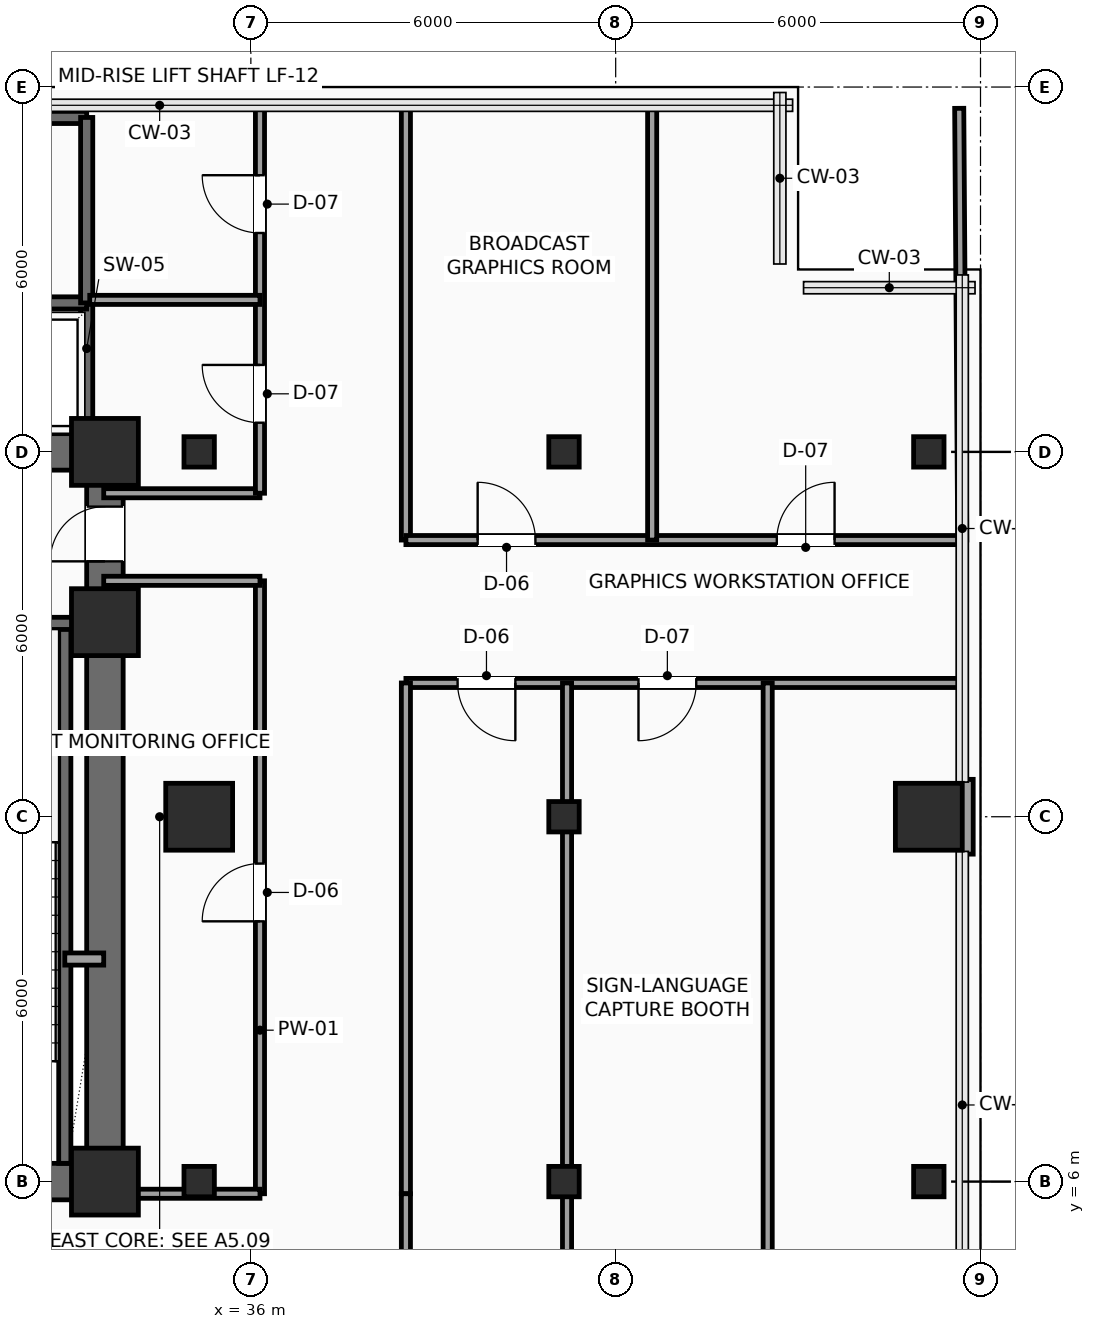
"""IFC4 building model, lengths in metres.
Left out: names, types, materials, properties, quantities, classifications, styles, units other than length and angle.
Written with IfcOpenShell. Run it as: python <this file> out.ifc"""

import sys

from ifc_helpers import new_model, si_unit, direction, frame, frame_2d, origin, origin_2d, place, context, subcontext, project, spatial, rectangle, hollow_rectangle, extrude, element, fill, save


model = new_model("IFC4")
c1 = context("Model", 3, precision=1e-05, world=origin(), true_north=direction((0.0, 1.0)))
c2 = subcontext(c1, "Body", "Model", "MODEL_VIEW")
j1 = project(units=[si_unit("LENGTHUNIT", "METRE"), si_unit("PLANEANGLEUNIT", "RADIAN")], contexts=[c1])
p1 = place(None, origin())
s1 = spatial("IfcSite", under=j1, at=p1, CompositionType="ELEMENT")
p2 = place(p1, origin())
s2 = spatial("IfcBuilding", under=s1, at=p2, CompositionType="ELEMENT")
p3 = place(p2, frame((0.0, 0.0, 156.9)))
s3 = spatial("IfcBuildingStorey", under=s2, at=p3, CompositionType="ELEMENT", Elevation=156.9)
for number, where, z_axis, x_axis in (
    (1, (33.6, 6.0, 0.0), (0.0, 0.0, 1.0), (1.0, 0.0, 0.0)),
    (2, (33.6, 15.2, 0.0), (0.0, 0.0, 1.0), (1.0, 0.0, 0.0)),
    (3, (33.6, 18.0, 0.0), (0.0, 0.0, 1.0), (1.0, 0.0, 0.0)),
):
    element("IfcColumn", number, at=place(p3, frame(where, z_axis=z_axis, x_axis=x_axis)), inside=s3, PredefinedType="COLUMN", context=c2, shape_type="SweptSolid", body=[
        extrude(rectangle(XDim=1.1, YDim=1.1, at=origin_2d()), origin(), (0.0, 0.0, 1.0), 3.75),
    ])
p4 = place(p3, frame((35.15, 6.0, 0.0), z_axis=(0.0, 0.0, 1.0), x_axis=(1.0, 0.0, 0.0)))
e4 = element("IfcColumn", 4, at=p4, inside=s3, PredefinedType="COLUMN", context=c2, shape_type="SweptSolid", body=[
    extrude(hollow_rectangle(XDim=0.5, YDim=0.5, WallThickness=0.025, InnerFilletRadius=0.025, OuterFilletRadius=0.04, at=origin_2d()), origin(), (0.0, 0.0, 1.0), 3.75),
])
p5 = place(p3, frame((35.15, 12.0, 0.0), z_axis=(0.0, 0.0, 1.0), x_axis=(1.0, 0.0, 0.0)))
e5 = element("IfcColumn", 5, at=p5, inside=s3, PredefinedType="COLUMN", context=c2, shape_type="SweptSolid", body=[
    extrude(rectangle(XDim=1.1, YDim=1.1, at=origin_2d()), origin(), (0.0, 0.0, 1.0), 3.75),
])
for number, where, z_axis, x_axis in (
    (6, (35.15, 18.0, 0.0), (0.0, 0.0, 1.0), (1.0, 0.0, 0.0)),
    (7, (41.15, 6.0, 0.0), (0.0, 0.0, 1.0), (1.0, 0.0, 0.0)),
    (8, (41.15, 12.0, 0.0), (0.0, 0.0, 1.0), (1.0, 0.0, 0.0)),
    (9, (41.15, 18.0, 0.0), (0.0, 0.0, 1.0), (1.0, 0.0, 0.0)),
    (10, (47.15, 6.0, 0.0), (0.0, 0.0, 1.0), (1.0, 0.0, 0.0)),
):
    element("IfcColumn", number, at=place(p3, frame(where, z_axis=z_axis, x_axis=x_axis)), inside=s3, PredefinedType="COLUMN", context=c2, shape_type="SweptSolid", body=[
        extrude(hollow_rectangle(XDim=0.5, YDim=0.5, WallThickness=0.025, InnerFilletRadius=0.025, OuterFilletRadius=0.04, at=origin_2d()), origin(), (0.0, 0.0, 1.0), 3.75),
    ])
p6 = place(p3, frame((47.15, 12.0, 0.0), z_axis=(0.0, 0.0, 1.0), x_axis=(1.0, 0.0, 0.0)))
e11 = element("IfcColumn", 11, at=p6, inside=s3, PredefinedType="COLUMN", context=c2, shape_type="SweptSolid", body=[
    extrude(rectangle(XDim=1.1, YDim=1.1, at=origin_2d()), origin(), (0.0, 0.0, 1.0), 3.75),
])
p7 = place(p3, frame((47.15, 18.0, 0.0), z_axis=(0.0, 0.0, 1.0), x_axis=(1.0, 0.0, 0.0)))
e12 = element("IfcColumn", 12, at=p7, inside=s3, PredefinedType="COLUMN", context=c2, shape_type="SweptSolid", body=[
    extrude(hollow_rectangle(XDim=0.5, YDim=0.5, WallThickness=0.025, InnerFilletRadius=0.025, OuterFilletRadius=0.04, at=origin_2d()), origin(), (0.0, 0.0, 1.0), 3.75),
])
p8 = place(p3, frame((47.76, 12.615, 0.0), z_axis=(0.0, 0.0, 1.0), x_axis=(0.0, -1.0, 0.0)))
e13 = element("IfcWall", 13, at=p8, inside=s3, PredefinedType="SOLIDWALL", context=c2, shape_type="SweptSolid", body=[
    extrude(rectangle(XDim=1.23, YDim=0.24, at=frame_2d((0.615, 0.0))), origin(), (0.0, 0.0, 1.0), 3.525),
])
for number, where, z_axis, x_axis in (
    (14, (24.0, 6.0, 0.0), (0.0, 0.0, 1.0), (1.0, 0.0, 0.0)),
    (15, (24.0, 18.0, 0.0), (0.0, 0.0, 1.0), (1.0, 0.0, 0.0)),
):
    element("IfcWall", number, at=place(p3, frame(where, z_axis=z_axis, x_axis=x_axis)), inside=s3, PredefinedType="SHEAR", context=c2, shape_type="SweptSolid", body=[
        extrude(rectangle(XDim=9.6, YDim=0.6, at=frame_2d((4.8, 0.0))), origin(), (0.0, 0.0, 1.0), 3.525),
    ])
p9 = place(p3, frame((33.6, 6.0, 0.0), z_axis=(0.0, 0.0, 1.0), x_axis=(0.0, 1.0, 0.0)))
e16 = element("IfcWall", 16, at=p9, inside=s3, PredefinedType="SHEAR", context=c2, shape_type="SweptSolid", body=[
    extrude(rectangle(XDim=12.0, YDim=0.6, at=frame_2d((6.0, 0.0))), origin(), (0.0, 0.0, 1.0), 3.525),
])
p10 = place(p9, frame((10.2, 0.0, 0.0)))
e17 = element("IfcOpeningElement", 17, at=p10, cuts=e16, PredefinedType="OPENING", context=c2, shape_type="SweptSolid", body=[
    extrude(rectangle(XDim=0.9, YDim=2.15, at=frame_2d((0.45, 1.075))), frame((0.0, 0.31, 0.0), z_axis=(0.0, -1.0, 0.0), x_axis=(1.0, 0.0, 0.0)), (0.0, 0.0, 1.0), 0.62),
])
p11 = place(p3, frame((32.94, 6.3, 0.0), z_axis=(0.0, 0.0, 1.0), x_axis=(0.0, 1.0, 0.0)))
e18 = element("IfcWall", 18, at=p11, inside=s3, PredefinedType="SHEAR", context=c2, shape_type="SweptSolid", body=[
    extrude(rectangle(XDim=8.88, YDim=0.2, at=frame_2d((4.44, 0.0))), origin(), (0.0, 0.0, 1.0), 3.525),
])
p12 = place(p3, frame((29.26, 15.18, 0.0), z_axis=(0.0, 0.0, 1.0), x_axis=(1.0, 0.0, 0.0)))
e19 = element("IfcWall", 19, at=p12, inside=s3, PredefinedType="SHEAR", context=c2, shape_type="SweptSolid", body=[
    extrude(rectangle(XDim=4.04, YDim=0.2, at=frame_2d((2.02, 0.0))), origin(), (0.0, 0.0, 1.0), 3.525),
])
p13 = place(p3, frame((32.94, 9.66, 0.0), z_axis=(0.0, 0.0, 1.0), x_axis=(1.0, 0.0, 0.0)))
e20 = element("IfcWall", 20, at=p13, inside=s3, PredefinedType="SOLIDWALL", context=c2, shape_type="SweptSolid", body=[
    extrude(rectangle(XDim=0.64, YDim=0.2, at=frame_2d((0.32, 0.0))), origin(), (0.0, 0.0, 1.0), 3.525),
])
p14 = place(p3, frame((33.3, 18.1, 0.0), z_axis=(0.0, 0.0, 1.0), x_axis=(0.0, 1.0, 0.0)))
e21 = element("IfcWall", 21, at=p14, inside=s3, PredefinedType="SHEAR", context=c2, shape_type="SweptSolid", body=[
    extrude(rectangle(XDim=2.35, YDim=0.2, at=frame_2d((1.175, 0.0))), origin(), (0.0, 0.0, 1.0), 3.525),
])
p15 = place(p3, frame((24.25, 20.45, 0.0), z_axis=(0.0, 0.0, 1.0), x_axis=(1.0, 0.0, 0.0)))
e22 = element("IfcWall", 22, at=p15, inside=s3, PredefinedType="SHEAR", context=c2, shape_type="SweptSolid", body=[
    extrude(rectangle(XDim=9.05, YDim=0.2, at=frame_2d((4.525, 0.0))), origin(), (0.0, 0.0, 1.0), 3.525),
])
p16 = place(p15, frame((0.4, 0.0, 0.0)))
e23 = element("IfcOpeningElement", 23, at=p16, cuts=e22, PredefinedType="OPENING", context=c2, shape_type="SweptSolid", body=[
    extrude(rectangle(XDim=1.2, YDim=2.2, at=frame_2d((0.6, 1.1))), frame((0.0, 0.11, 0.0), z_axis=(0.0, -1.0, 0.0), x_axis=(1.0, 0.0, 0.0)), (0.0, 0.0, 1.0), 0.22),
])
p17 = place(p15, frame((2.65, 0.0, 0.0)))
e24 = element("IfcOpeningElement", 24, at=p17, cuts=e22, PredefinedType="OPENING", context=c2, shape_type="SweptSolid", body=[
    extrude(rectangle(XDim=1.2, YDim=2.2, at=frame_2d((0.6, 1.1))), frame((0.0, 0.11, 0.0), z_axis=(0.0, -1.0, 0.0), x_axis=(1.0, 0.0, 0.0)), (0.0, 0.0, 1.0), 0.22),
])
p18 = place(p15, frame((4.9, 0.0, 0.0)))
e25 = element("IfcOpeningElement", 25, at=p18, cuts=e22, PredefinedType="OPENING", context=c2, shape_type="SweptSolid", body=[
    extrude(rectangle(XDim=1.2, YDim=2.2, at=frame_2d((0.6, 1.1))), frame((0.0, 0.11, 0.0), z_axis=(0.0, -1.0, 0.0), x_axis=(1.0, 0.0, 0.0)), (0.0, 0.0, 1.0), 0.22),
])
p19 = place(p15, frame((7.15, 0.0, 0.0)))
e26 = element("IfcOpeningElement", 26, at=p19, cuts=e22, PredefinedType="OPENING", context=c2, shape_type="SweptSolid", body=[
    extrude(rectangle(XDim=1.2, YDim=2.2, at=frame_2d((0.6, 1.1))), frame((0.0, 0.11, 0.0), z_axis=(0.0, -1.0, 0.0), x_axis=(1.0, 0.0, 0.0)), (0.0, 0.0, 1.0), 0.22),
])
p20 = place(p3, frame((24.15, 23.5, 0.0), z_axis=(0.0, 0.0, 1.0), x_axis=(1.0, 0.0, 0.0)))
e27 = element("IfcWall", 27, at=p20, inside=s3, PredefinedType="SHEAR", context=c2, shape_type="SweptSolid", body=[
    extrude(rectangle(XDim=9.15, YDim=0.2, at=frame_2d((4.575, 0.0))), origin(), (0.0, 0.0, 1.0), 3.525),
])
p21 = place(p3, frame((33.3, 20.45, 0.0), z_axis=(0.0, 0.0, 1.0), x_axis=(0.0, 1.0, 0.0)))
e28 = element("IfcWall", 28, at=p21, inside=s3, PredefinedType="SHEAR", context=c2, shape_type="SweptSolid", body=[
    extrude(rectangle(XDim=3.05, YDim=0.2, at=frame_2d((1.525, 0.0))), origin(), (0.0, 0.0, 1.0), 3.525),
])
p22 = place(p3, frame((36.15, 5.8, 0.0), z_axis=(0.0, 0.0, 1.0), x_axis=(0.0, 1.0, 0.0)))
e29 = element("IfcWall", 29, at=p22, inside=s3, PredefinedType="PARTITIONING", context=c2, shape_type="SweptSolid", body=[
    extrude(rectangle(XDim=10.08, YDim=0.15, at=frame_2d((5.04, 0.0))), origin(), (0.0, 0.0, 1.0), 3.525),
])
p23 = place(p22, frame((4.48, 0.0, 0.0)))
e30 = element("IfcOpeningElement", 30, at=p23, cuts=e29, PredefinedType="OPENING", context=c2, shape_type="SweptSolid", body=[
    extrude(rectangle(XDim=0.95, YDim=2.15, at=frame_2d((0.475, 1.075))), frame((0.0, 0.085, 0.0), z_axis=(0.0, -1.0, 0.0), x_axis=(1.0, 0.0, 0.0)), (0.0, 0.0, 1.0), 0.17),
])
for number, where, z_axis, x_axis in (
    (31, (36.15, 15.88, 0.0), (0.0, 0.0, 1.0), (-1.0, 0.0, 0.0)),
    (32, (33.58, 17.32, 0.0), (0.0, 0.0, 1.0), (1.0, 0.0, 0.0)),
):
    element("IfcWall", number, at=place(p3, frame(where, z_axis=z_axis, x_axis=x_axis)), inside=s3, PredefinedType="PARTITIONING", context=c2, shape_type="SweptSolid", body=[
        extrude(rectangle(XDim=2.57, YDim=0.15, at=frame_2d((1.285, 0.0))), origin(), (0.0, 0.0, 1.0), 3.525),
    ])
p24 = place(p3, frame((36.15, 17.32, 0.0), z_axis=(0.0, 0.0, 1.0), x_axis=(0.0, 1.0, 0.0)))
e33 = element("IfcWall", 33, at=p24, inside=s3, PredefinedType="PARTITIONING", context=c2, shape_type="SweptSolid", body=[
    extrude(rectangle(XDim=6.38, YDim=0.15, at=frame_2d((3.19, 0.0))), origin(), (0.0, 0.0, 1.0), 3.525),
])
p25 = place(p24, frame((1.16, 0.0, 0.0)))
e34 = element("IfcOpeningElement", 34, at=p25, cuts=e33, PredefinedType="OPENING", context=c2, shape_type="SweptSolid", body=[
    extrude(rectangle(XDim=0.95, YDim=2.15, at=frame_2d((0.475, 1.075))), frame((0.0, 0.085, 0.0), z_axis=(0.0, -1.0, 0.0), x_axis=(1.0, 0.0, 0.0)), (0.0, 0.0, 1.0), 0.17),
])
p26 = place(p24, frame((4.28, 0.0, 0.0)))
e35 = element("IfcOpeningElement", 35, at=p26, cuts=e33, PredefinedType="OPENING", context=c2, shape_type="SweptSolid", body=[
    extrude(rectangle(XDim=0.95, YDim=2.15, at=frame_2d((0.475, 1.075))), frame((0.0, 0.085, 0.0), z_axis=(0.0, -1.0, 0.0), x_axis=(1.0, 0.0, 0.0)), (0.0, 0.0, 1.0), 0.17),
])
p27 = place(p3, frame((38.55, 23.7, 0.0), z_axis=(0.0, 0.0, 1.0), x_axis=(0.0, -1.0, 0.0)))
e36 = element("IfcWall", 36, at=p27, inside=s3, PredefinedType="PARTITIONING", context=c2, shape_type="SweptSolid", body=[
    extrude(rectangle(XDim=7.15, YDim=0.15, at=frame_2d((3.575, 0.0))), origin(), (0.0, 0.0, 1.0), 3.525),
])
p28 = place(p3, frame((38.55, 16.55, 0.0), z_axis=(0.0, 0.0, 1.0), x_axis=(1.0, 0.0, 0.0)))
e37 = element("IfcWall", 37, at=p28, inside=s3, PredefinedType="PARTITIONING", context=c2, shape_type="SweptSolid", body=[
    extrude(rectangle(XDim=9.15, YDim=0.15, at=frame_2d((4.575, 0.0))), origin(), (0.0, 0.0, 1.0), 3.525),
])
p29 = place(p28, frame((1.18, 0.0, 0.0)))
e38 = element("IfcOpeningElement", 38, at=p29, cuts=e37, PredefinedType="OPENING", context=c2, shape_type="SweptSolid", body=[
    extrude(rectangle(XDim=0.95, YDim=2.15, at=frame_2d((0.475, 1.075))), frame((0.0, 0.085, 0.0), z_axis=(0.0, -1.0, 0.0), x_axis=(1.0, 0.0, 0.0)), (0.0, 0.0, 1.0), 0.17),
])
p30 = place(p28, frame((6.1, 0.0, 0.0)))
e39 = element("IfcOpeningElement", 39, at=p30, cuts=e37, PredefinedType="OPENING", context=c2, shape_type="SweptSolid", body=[
    extrude(rectangle(XDim=0.95, YDim=2.15, at=frame_2d((0.475, 1.075))), frame((0.0, 0.085, 0.0), z_axis=(0.0, -1.0, 0.0), x_axis=(1.0, 0.0, 0.0)), (0.0, 0.0, 1.0), 0.17),
])
p31 = place(p3, frame((47.7, 14.2, 0.0), z_axis=(0.0, 0.0, 1.0), x_axis=(-1.0, 0.0, 0.0)))
e40 = element("IfcWall", 40, at=p31, inside=s3, PredefinedType="PARTITIONING", context=c2, shape_type="SweptSolid", body=[
    extrude(rectangle(XDim=9.15, YDim=0.15, at=frame_2d((4.575, 0.0))), origin(), (0.0, 0.0, 1.0), 3.525),
])
p32 = place(p31, frame((7.35, 0.0, 0.0)))
e41 = element("IfcOpeningElement", 41, at=p32, cuts=e40, PredefinedType="OPENING", context=c2, shape_type="SweptSolid", body=[
    extrude(rectangle(XDim=0.95, YDim=2.15, at=frame_2d((0.475, 1.075))), frame((0.0, 0.085, 0.0), z_axis=(0.0, -1.0, 0.0), x_axis=(1.0, 0.0, 0.0)), (0.0, 0.0, 1.0), 0.17),
])
p33 = place(p31, frame((4.375, 0.0, 0.0)))
e42 = element("IfcOpeningElement", 42, at=p33, cuts=e40, PredefinedType="OPENING", context=c2, shape_type="SweptSolid", body=[
    extrude(rectangle(XDim=0.95, YDim=2.15, at=frame_2d((0.475, 1.075))), frame((0.0, 0.085, 0.0), z_axis=(0.0, -1.0, 0.0), x_axis=(1.0, 0.0, 0.0)), (0.0, 0.0, 1.0), 0.17),
])
p34 = place(p3, frame((38.55, 14.2, 0.0), z_axis=(0.0, 0.0, 1.0), x_axis=(0.0, -1.0, 0.0)))
e43 = element("IfcWall", 43, at=p34, inside=s3, PredefinedType="PARTITIONING", context=c2, shape_type="SweptSolid", body=[
    extrude(rectangle(XDim=8.4, YDim=0.15, at=frame_2d((4.2, 0.0))), origin(), (0.0, 0.0, 1.0), 3.525),
])
p35 = place(p3, frame((38.55, 5.8, 0.0), z_axis=(0.0, 0.0, 1.0), x_axis=(0.0, -1.0, 0.0)))
e44 = element("IfcWall", 44, at=p35, inside=s3, PredefinedType="PARTITIONING", context=c2, shape_type="SweptSolid", body=[
    extrude(rectangle(XDim=2.35, YDim=0.15, at=frame_2d((1.175, 0.0))), origin(), (0.0, 0.0, 1.0), 3.525),
])
p36 = place(p3, frame((33.65, 5.8, 0.0), z_axis=(0.0, 0.0, 1.0), x_axis=(1.0, 0.0, 0.0)))
e45 = element("IfcWall", 45, at=p36, inside=s3, PredefinedType="PARTITIONING", context=c2, shape_type="SweptSolid", body=[
    extrude(rectangle(XDim=2.5, YDim=0.15, at=frame_2d((1.25, 0.0))), origin(), (0.0, 0.0, 1.0), 3.017),
])
p37 = place(p3, frame((33.35, 20.5, 0.0), z_axis=(0.0, 0.0, 1.0), x_axis=(1.0, 0.0, 0.0)))
e46 = element("IfcWall", 46, at=p37, inside=s3, PredefinedType="PARTITIONING", context=c2, shape_type="SweptSolid", body=[
    extrude(rectangle(XDim=2.8, YDim=0.15, at=frame_2d((1.4, 0.0))), origin(), (0.0, 0.0, 1.0), 3.525),
])
p38 = place(p3, frame((41.2, 0.3, 0.0), z_axis=(0.0, 0.0, 1.0), x_axis=(0.0, 1.0, 0.0)))
e47 = element("IfcWall", 47, at=p38, inside=s3, PredefinedType="PARTITIONING", context=c2, shape_type="SweptSolid", body=[
    extrude(rectangle(XDim=13.9, YDim=0.15, at=frame_2d((6.95, 0.0))), origin(), (0.0, 0.0, 1.0), 3.017),
])
p39 = place(p3, frame((44.5, 0.3, 0.0), z_axis=(0.0, 0.0, 1.0), x_axis=(0.0, 1.0, 0.0)))
e48 = element("IfcWall", 48, at=p39, inside=s3, PredefinedType="PARTITIONING", context=c2, shape_type="SweptSolid", body=[
    extrude(rectangle(XDim=13.9, YDim=0.15, at=frame_2d((6.95, 0.0))), origin(), (0.0, 0.0, 1.0), 3.525),
])
p40 = place(p3, frame((42.6, 16.55, 0.0), z_axis=(0.0, 0.0, 1.0), x_axis=(0.0, 1.0, 0.0)))
e49 = element("IfcWall", 49, at=p40, inside=s3, PredefinedType="PARTITIONING", context=c2, shape_type="SweptSolid", body=[
    extrude(rectangle(XDim=7.15, YDim=0.15, at=frame_2d((3.575, 0.0))), origin(), (0.0, 0.0, 1.0), 3.525),
])
p41 = place(p3, frame((47.7, 16.55, 0.0), z_axis=(0.0, 0.0, 1.0), x_axis=(-0.007049101019, 0.999975154779, 0.0)))
e50 = element("IfcWall", 50, at=p41, inside=s3, PredefinedType="PARTITIONING", context=c2, shape_type="SweptSolid", body=[
    extrude(rectangle(XDim=7.1, YDim=0.15, at=frame_2d((3.55, 0.0))), origin(), (0.0, 0.0, 1.0), 3.525),
])
p42 = place(p10, origin())
e51 = element("IfcDoor", 51, at=p42, inside=s3, OperationType="SINGLE_SWING_LEFT", PredefinedType="DOOR", context=c2, shape_type="SweptSolid", body=[
    extrude(rectangle(XDim=0.9, YDim=2.15, at=frame_2d((0.45, 1.075))), frame((0.0, 0.025, 0.0), z_axis=(0.0, -1.0, 0.0), x_axis=(1.0, 0.0, 0.0)), (0.0, 0.0, 1.0), 0.05),
])
fill(e17, e51)
p43 = place(p23, origin())
e52 = element("IfcDoor", 52, at=p43, inside=s3, OperationType="SINGLE_SWING_LEFT", PredefinedType="DOOR", context=c2, shape_type="SweptSolid", body=[
    extrude(rectangle(XDim=0.95, YDim=2.15, at=frame_2d((0.475, 1.075))), frame((0.0, 0.025, 0.0), z_axis=(0.0, -1.0, 0.0), x_axis=(1.0, 0.0, 0.0)), (0.0, 0.0, 1.0), 0.05),
])
fill(e30, e52)
p44 = place(p25, origin())
e53 = element("IfcDoor", 53, at=p44, inside=s3, OperationType="SINGLE_SWING_RIGHT", PredefinedType="DOOR", context=c2, shape_type="SweptSolid", body=[
    extrude(rectangle(XDim=0.95, YDim=2.15, at=frame_2d((0.475, 1.075))), frame((0.0, 0.025, 0.0), z_axis=(0.0, -1.0, 0.0), x_axis=(1.0, 0.0, 0.0)), (0.0, 0.0, 1.0), 0.05),
])
fill(e34, e53)
p45 = place(p26, origin())
e54 = element("IfcDoor", 54, at=p45, inside=s3, OperationType="SINGLE_SWING_RIGHT", PredefinedType="DOOR", context=c2, shape_type="SweptSolid", body=[
    extrude(rectangle(XDim=0.95, YDim=2.15, at=frame_2d((0.475, 1.075))), frame((0.0, 0.025, 0.0), z_axis=(0.0, -1.0, 0.0), x_axis=(1.0, 0.0, 0.0)), (0.0, 0.0, 1.0), 0.05),
])
fill(e35, e54)
p46 = place(p29, origin())
e55 = element("IfcDoor", 55, at=p46, inside=s3, OperationType="SINGLE_SWING_LEFT", PredefinedType="DOOR", context=c2, shape_type="SweptSolid", body=[
    extrude(rectangle(XDim=0.95, YDim=2.15, at=frame_2d((0.475, 1.075))), frame((0.0, 0.025, 0.0), z_axis=(0.0, -1.0, 0.0), x_axis=(1.0, 0.0, 0.0)), (0.0, 0.0, 1.0), 0.05),
])
fill(e38, e55)
p47 = place(p30, origin())
e56 = element("IfcDoor", 56, at=p47, inside=s3, OperationType="SINGLE_SWING_RIGHT", PredefinedType="DOOR", context=c2, shape_type="SweptSolid", body=[
    extrude(rectangle(XDim=0.95, YDim=2.15, at=frame_2d((0.475, 1.075))), frame((0.0, 0.025, 0.0), z_axis=(0.0, -1.0, 0.0), x_axis=(1.0, 0.0, 0.0)), (0.0, 0.0, 1.0), 0.05),
])
fill(e39, e56)
p48 = place(p32, origin())
e57 = element("IfcDoor", 57, at=p48, inside=s3, OperationType="SINGLE_SWING_LEFT", PredefinedType="DOOR", context=c2, shape_type="SweptSolid", body=[
    extrude(rectangle(XDim=0.95, YDim=2.15, at=frame_2d((0.475, 1.075))), frame((0.0, 0.025, 0.0), z_axis=(0.0, -1.0, 0.0), x_axis=(1.0, 0.0, 0.0)), (0.0, 0.0, 1.0), 0.05),
])
fill(e41, e57)
p49 = place(p33, origin())
e58 = element("IfcDoor", 58, at=p49, inside=s3, OperationType="SINGLE_SWING_RIGHT", PredefinedType="DOOR", context=c2, shape_type="SweptSolid", body=[
    extrude(rectangle(XDim=0.95, YDim=2.15, at=frame_2d((0.475, 1.075))), frame((0.0, 0.025, 0.0), z_axis=(0.0, -1.0, 0.0), x_axis=(1.0, 0.0, 0.0)), (0.0, 0.0, 1.0), 0.05),
])
fill(e42, e58)
save(model, sys.argv[1])
